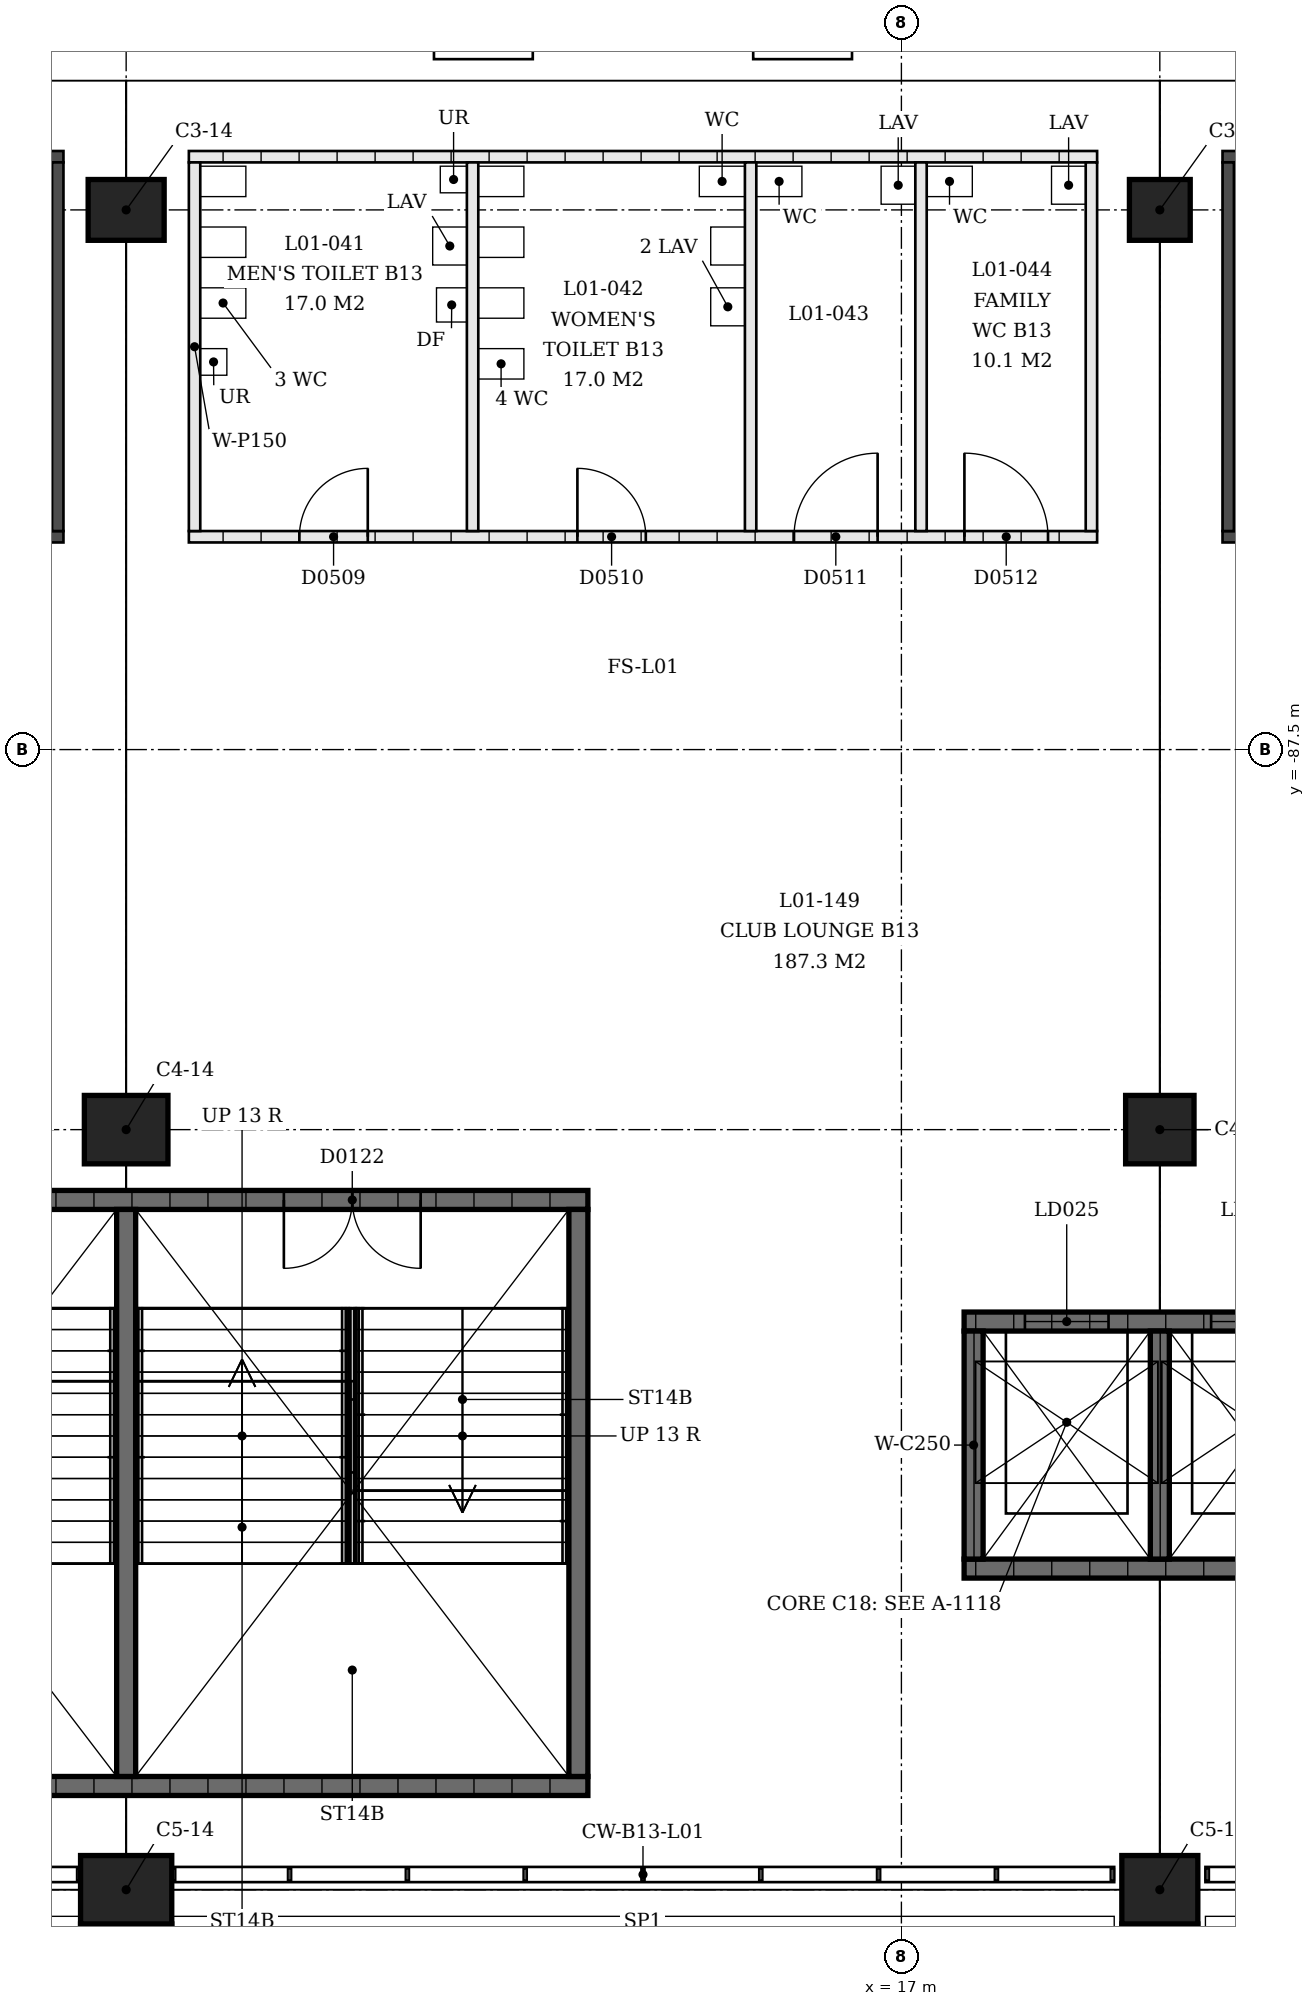
"""IFC4 building model, lengths in metres.
Left out: names, types, materials, properties, quantities, classifications, styles, units other than length and angle.
Written with IfcOpenShell. Run it as: python <this file> out.ifc"""

import sys

from ifc_helpers import new_model, si_unit, direction, frame, frame_2d, origin, origin_2d, place, context, subcontext, project, spatial, rectangle, extrude, element, fill, save


model = new_model("IFC4")
c1 = context("Model", 3, precision=1e-05, world=origin(), true_north=direction((0.0, 1.0)))
c2 = subcontext(c1, "Body", "Model", "MODEL_VIEW")
j1 = project(units=[si_unit("LENGTHUNIT", "METRE"), si_unit("PLANEANGLEUNIT", "RADIAN")], contexts=[c1])
p1 = place(None, origin())
s1 = spatial("IfcSite", under=j1, at=p1, CompositionType="ELEMENT")
p2 = place(p1, origin())
s2 = spatial("IfcBuilding", under=s1, at=p2, CompositionType="ELEMENT")
p3 = place(p2, frame((0.0, 0.0, 4.5)))
s3 = spatial("IfcBuildingStorey", under=s2, at=p3, CompositionType="ELEMENT", Elevation=4.5)
p4 = place(p3, frame((20.4, -80.4, 0.0), z_axis=(0.0, 0.0, 1.0), x_axis=(1.0, 0.0, 0.0)))
e1 = element("IfcColumn", 1, at=p4, inside=s3, PredefinedType="COLUMN", context=c2, shape_type="SweptSolid", body=[
    extrude(rectangle(XDim=0.8, YDim=0.8, at=origin_2d()), origin(), (0.0, 0.0, 1.0), 4.5),
])
p5 = place(p3, frame((20.4, -92.5, 0.0), z_axis=(0.0, 0.0, 1.0), x_axis=(1.0, 0.0, 0.0)))
e2 = element("IfcColumn", 2, at=p5, inside=s3, PredefinedType="COLUMN", context=c2, shape_type="SweptSolid", body=[
    extrude(rectangle(XDim=0.9, YDim=0.9, at=origin_2d()), origin(), (0.0, 0.0, 1.0), 4.5),
])
p6 = place(p3, frame((20.4, -102.5, 0.0), z_axis=(0.0, 0.0, 1.0), x_axis=(1.0, 0.0, 0.0)))
e3 = element("IfcColumn", 3, at=p6, inside=s3, PredefinedType="COLUMN", context=c2, shape_type="SweptSolid", body=[
    extrude(rectangle(XDim=1.0, YDim=0.9, at=origin_2d()), origin(), (0.0, 0.0, 1.0), 4.5),
])
p7 = place(p3, frame((6.8, -80.4, 0.0), z_axis=(0.0, 0.0, 1.0), x_axis=(1.0, 0.0, 0.0)))
e4 = element("IfcColumn", 4, at=p7, inside=s3, PredefinedType="COLUMN", context=c2, shape_type="SweptSolid", body=[
    extrude(rectangle(XDim=1.0, YDim=0.8, at=origin_2d()), origin(), (0.0, 0.0, 1.0), 4.5),
])
p8 = place(p3, frame((6.8, -92.5, 0.0), z_axis=(0.0, 0.0, 1.0), x_axis=(1.0, 0.0, 0.0)))
e5 = element("IfcColumn", 5, at=p8, inside=s3, PredefinedType="COLUMN", context=c2, shape_type="SweptSolid", body=[
    extrude(rectangle(XDim=1.1, YDim=0.9, at=origin_2d()), origin(), (0.0, 0.0, 1.0), 4.5),
])
p9 = place(p3, frame((6.8, -102.5, 0.0), z_axis=(0.0, 0.0, 1.0), x_axis=(1.0, 0.0, 0.0)))
e6 = element("IfcColumn", 6, at=p9, inside=s3, PredefinedType="COLUMN", context=c2, shape_type="SweptSolid", body=[
    extrude(rectangle(XDim=1.2, YDim=0.9, at=origin_2d()), origin(), (0.0, 0.0, 1.0), 4.5),
])
p10 = place(p3, frame((0.725, -93.425, 0.0), z_axis=(0.0, 0.0, 1.0), x_axis=(1.0, 0.0, 0.0)))
e7 = element("IfcWall", 7, at=p10, inside=s3, PredefinedType="SHEAR", context=c2, shape_type="SweptSolid", body=[
    extrude(rectangle(XDim=12.15, YDim=0.25, at=frame_2d((6.075, 0.0))), origin(), (0.0, 0.0, 1.0), 4.09),
])
p11 = place(p10, frame((2.2, 0.0, 0.0)))
e8 = element("IfcOpeningElement", 8, at=p11, cuts=e7, PredefinedType="OPENING", context=c2, shape_type="SweptSolid", body=[
    extrude(rectangle(XDim=1.8, YDim=2.1, at=frame_2d((0.9, 1.05))), frame((0.0, 0.125, 0.0), z_axis=(0.0, -1.0, 0.0), x_axis=(1.0, 0.0, 0.0)), (0.0, 0.0, 1.0), 0.25),
])
p12 = place(p10, frame((8.15, 0.0, 0.0)))
e9 = element("IfcOpeningElement", 9, at=p12, cuts=e7, PredefinedType="OPENING", context=c2, shape_type="SweptSolid", body=[
    extrude(rectangle(XDim=1.8, YDim=2.1, at=frame_2d((0.9, 1.05))), frame((0.0, 0.125, 0.0), z_axis=(0.0, -1.0, 0.0), x_axis=(1.0, 0.0, 0.0)), (0.0, 0.0, 1.0), 0.25),
])
p13 = place(p3, frame((0.725, -101.135, 0.0), z_axis=(0.0, 0.0, 1.0), x_axis=(1.0, 0.0, 0.0)))
e10 = element("IfcWall", 10, at=p13, inside=s3, PredefinedType="SHEAR", context=c2, shape_type="SweptSolid", body=[
    extrude(rectangle(XDim=12.15, YDim=0.25, at=frame_2d((6.075, 0.0))), origin(), (0.0, 0.0, 1.0), 4.09),
])
for number, where, z_axis, x_axis in (
    (11, (12.75, -93.55, 0.0), (0.0, 0.0, 1.0), (0.0, -1.0, 0.0)),
    (12, (6.8, -93.55, 0.0), (0.0, 0.0, 1.0), (0.0, -1.0, 0.0)),
):
    element("IfcWall", number, at=place(p3, frame(where, z_axis=z_axis, x_axis=x_axis)), inside=s3, PredefinedType="SHEAR", context=c2, shape_type="SweptSolid", body=[
        extrude(rectangle(XDim=7.46, YDim=0.25, at=frame_2d((3.73, 0.0))), origin(), (0.0, 0.0, 1.0), 4.09),
    ])
p14 = place(p3, frame((17.825, -95.025, 0.0), z_axis=(0.0, 0.0, 1.0), x_axis=(1.0, 0.0, 0.0)))
e13 = element("IfcWall", 13, at=p14, inside=s3, PredefinedType="SHEAR", context=c2, shape_type="SweptSolid", body=[
    extrude(rectangle(XDim=5.15, YDim=0.25, at=frame_2d((2.575, 0.0))), origin(), (0.0, 0.0, 1.0), 4.09),
])
p15 = place(p14, frame((0.8, 0.0, 0.0)))
e14 = element("IfcOpeningElement", 14, at=p15, cuts=e13, PredefinedType="OPENING", context=c2, shape_type="SweptSolid", body=[
    extrude(rectangle(XDim=1.1, YDim=2.1, at=frame_2d((0.55, 1.05))), frame((0.0, 0.125, 0.0), z_axis=(0.0, -1.0, 0.0), x_axis=(1.0, 0.0, 0.0)), (0.0, 0.0, 1.0), 0.25),
])
p16 = place(p14, frame((3.25, 0.0, 0.0)))
e15 = element("IfcOpeningElement", 15, at=p16, cuts=e13, PredefinedType="OPENING", context=c2, shape_type="SweptSolid", body=[
    extrude(rectangle(XDim=1.1, YDim=2.1, at=frame_2d((0.55, 1.05))), frame((0.0, 0.125, 0.0), z_axis=(0.0, -1.0, 0.0), x_axis=(1.0, 0.0, 0.0)), (0.0, 0.0, 1.0), 0.25),
])
p17 = place(p3, frame((17.825, -98.275, 0.0), z_axis=(0.0, 0.0, 1.0), x_axis=(1.0, 0.0, 0.0)))
e16 = element("IfcWall", 16, at=p17, inside=s3, PredefinedType="SHEAR", context=c2, shape_type="SweptSolid", body=[
    extrude(rectangle(XDim=5.15, YDim=0.25, at=frame_2d((2.575, 0.0))), origin(), (0.0, 0.0, 1.0), 4.09),
])
for number, where, z_axis, x_axis in (
    (17, (17.95, -95.15, 0.0), (0.0, 0.0, 1.0), (0.0, -1.0, 0.0)),
    (18, (20.4, -95.15, 0.0), (0.0, 0.0, 1.0), (0.0, -1.0, 0.0)),
):
    element("IfcWall", number, at=place(p3, frame(where, z_axis=z_axis, x_axis=x_axis)), inside=s3, PredefinedType="SHEAR", context=c2, shape_type="SweptSolid", body=[
        extrude(rectangle(XDim=3.0, YDim=0.25, at=frame_2d((1.5, 0.0))), origin(), (0.0, 0.0, 1.0), 4.09),
    ])
p18 = place(p3, frame((33.175, -79.7, 0.0), z_axis=(0.0, 0.0, 1.0), x_axis=(-1.0, 0.0, 0.0)))
e19 = element("IfcWall", 19, at=p18, inside=s3, PredefinedType="SOLIDWALL", context=c2, shape_type="SweptSolid", body=[
    extrude(rectangle(XDim=11.95, YDim=0.15, at=frame_2d((5.975, 0.0))), origin(), (0.0, 0.0, 1.0), 3.0),
])
p19 = place(p3, frame((33.175, -84.7, 0.0), z_axis=(0.0, 0.0, 1.0), x_axis=(-1.0, 0.0, 0.0)))
e20 = element("IfcWall", 20, at=p19, inside=s3, PredefinedType="SOLIDWALL", context=c2, shape_type="SweptSolid", body=[
    extrude(rectangle(XDim=11.95, YDim=0.15, at=frame_2d((5.975, 0.0))), origin(), (0.0, 0.0, 1.0), 3.0),
])
p20 = place(p19, frame((2.525, 0.0, 0.0)))
e21 = element("IfcOpeningElement", 21, at=p20, cuts=e20, PredefinedType="OPENING", context=c2, shape_type="SweptSolid", body=[
    extrude(rectangle(XDim=1.0, YDim=2.1, at=frame_2d((0.5, 1.05))), frame((0.0, 0.075, 0.0), z_axis=(0.0, -1.0, 0.0), x_axis=(1.0, 0.0, 0.0)), (0.0, 0.0, 1.0), 0.15),
])
p21 = place(p19, frame((8.425, 0.0, 0.0)))
e22 = element("IfcOpeningElement", 22, at=p21, cuts=e20, PredefinedType="OPENING", context=c2, shape_type="SweptSolid", body=[
    extrude(rectangle(XDim=1.0, YDim=2.1, at=frame_2d((0.5, 1.05))), frame((0.0, 0.075, 0.0), z_axis=(0.0, -1.0, 0.0), x_axis=(1.0, 0.0, 0.0)), (0.0, 0.0, 1.0), 0.15),
])
p22 = place(p3, frame((21.3, -79.775, 0.0), z_axis=(0.0, 0.0, 1.0), x_axis=(0.0, -1.0, 0.0)))
e23 = element("IfcWall", 23, at=p22, inside=s3, PredefinedType="SOLIDWALL", context=c2, shape_type="SweptSolid", body=[
    extrude(rectangle(XDim=4.85, YDim=0.15, at=frame_2d((2.425, 0.0))), origin(), (0.0, 0.0, 1.0), 3.0),
])
p23 = place(p3, frame((7.625, -79.7, 0.0), z_axis=(0.0, 0.0, 1.0), x_axis=(1.0, 0.0, 0.0)))
e24 = element("IfcWall", 24, at=p23, inside=s3, PredefinedType="PARTITIONING", context=c2, shape_type="SweptSolid", body=[
    extrude(rectangle(XDim=11.95, YDim=0.15, at=frame_2d((5.975, 0.0))), origin(), (0.0, 0.0, 1.0), 3.0),
])
p24 = place(p3, frame((7.625, -84.7, 0.0), z_axis=(0.0, 0.0, 1.0), x_axis=(1.0, 0.0, 0.0)))
e25 = element("IfcWall", 25, at=p24, inside=s3, PredefinedType="PARTITIONING", context=c2, shape_type="SweptSolid", body=[
    extrude(rectangle(XDim=11.95, YDim=0.15, at=frame_2d((5.975, 0.0))), origin(), (0.0, 0.0, 1.0), 3.0),
])
p25 = place(p24, frame((1.454, 0.0, 0.0)))
e26 = element("IfcOpeningElement", 26, at=p25, cuts=e25, PredefinedType="OPENING", context=c2, shape_type="SweptSolid", body=[
    extrude(rectangle(XDim=0.9, YDim=2.1, at=frame_2d((0.45, 1.05))), frame((0.0, 0.075, 0.0), z_axis=(0.0, -1.0, 0.0), x_axis=(1.0, 0.0, 0.0)), (0.0, 0.0, 1.0), 0.15),
])
p26 = place(p24, frame((5.112, 0.0, 0.0)))
e27 = element("IfcOpeningElement", 27, at=p26, cuts=e25, PredefinedType="OPENING", context=c2, shape_type="SweptSolid", body=[
    extrude(rectangle(XDim=0.9, YDim=2.1, at=frame_2d((0.45, 1.05))), frame((0.0, 0.075, 0.0), z_axis=(0.0, -1.0, 0.0), x_axis=(1.0, 0.0, 0.0)), (0.0, 0.0, 1.0), 0.15),
])
p27 = place(p24, frame((7.962, 0.0, 0.0)))
e28 = element("IfcOpeningElement", 28, at=p27, cuts=e25, PredefinedType="OPENING", context=c2, shape_type="SweptSolid", body=[
    extrude(rectangle(XDim=1.1, YDim=2.1, at=frame_2d((0.55, 1.05))), frame((0.0, 0.075, 0.0), z_axis=(0.0, -1.0, 0.0), x_axis=(1.0, 0.0, 0.0)), (0.0, 0.0, 1.0), 0.15),
])
p28 = place(p24, frame((10.204, 0.0, 0.0)))
e29 = element("IfcOpeningElement", 29, at=p28, cuts=e25, PredefinedType="OPENING", context=c2, shape_type="SweptSolid", body=[
    extrude(rectangle(XDim=1.1, YDim=2.1, at=frame_2d((0.55, 1.05))), frame((0.0, 0.075, 0.0), z_axis=(0.0, -1.0, 0.0), x_axis=(1.0, 0.0, 0.0)), (0.0, 0.0, 1.0), 0.15),
])
for number, where, z_axis, x_axis in (
    (30, (7.7, -79.775, 0.0), (0.0, 0.0, 1.0), (0.0, -1.0, 0.0)),
    (31, (11.358, -79.775, 0.0), (0.0, 0.0, 1.0), (0.0, -1.0, 0.0)),
    (32, (15.016, -79.775, 0.0), (0.0, 0.0, 1.0), (0.0, -1.0, 0.0)),
    (33, (17.258, -79.775, 0.0), (0.0, 0.0, 1.0), (0.0, -1.0, 0.0)),
    (34, (19.5, -79.775, 0.0), (0.0, 0.0, 1.0), (0.0, -1.0, 0.0)),
):
    element("IfcWall", number, at=place(p3, frame(where, z_axis=z_axis, x_axis=x_axis)), inside=s3, PredefinedType="PARTITIONING", context=c2, shape_type="SweptSolid", body=[
        extrude(rectangle(XDim=4.85, YDim=0.15, at=frame_2d((2.425, 0.0))), origin(), (0.0, 0.0, 1.0), 3.0),
    ])
p29 = place(p3, frame((5.975, -79.7, 0.0), z_axis=(0.0, 0.0, 1.0), x_axis=(-1.0, 0.0, 0.0)))
e35 = element("IfcWall", 35, at=p29, inside=s3, PredefinedType="SOLIDWALL", context=c2, shape_type="SweptSolid", body=[
    extrude(rectangle(XDim=11.95, YDim=0.15, at=frame_2d((5.975, 0.0))), origin(), (0.0, 0.0, 1.0), 3.0),
])
p30 = place(p3, frame((5.975, -84.7, 0.0), z_axis=(0.0, 0.0, 1.0), x_axis=(-1.0, 0.0, 0.0)))
e36 = element("IfcWall", 36, at=p30, inside=s3, PredefinedType="SOLIDWALL", context=c2, shape_type="SweptSolid", body=[
    extrude(rectangle(XDim=11.95, YDim=0.15, at=frame_2d((5.975, 0.0))), origin(), (0.0, 0.0, 1.0), 3.0),
])
p31 = place(p30, frame((2.525, 0.0, 0.0)))
e37 = element("IfcOpeningElement", 37, at=p31, cuts=e36, PredefinedType="OPENING", context=c2, shape_type="SweptSolid", body=[
    extrude(rectangle(XDim=1.0, YDim=2.1, at=frame_2d((0.5, 1.05))), frame((0.0, 0.075, 0.0), z_axis=(0.0, -1.0, 0.0), x_axis=(1.0, 0.0, 0.0)), (0.0, 0.0, 1.0), 0.15),
])
p32 = place(p30, frame((8.425, 0.0, 0.0)))
e38 = element("IfcOpeningElement", 38, at=p32, cuts=e36, PredefinedType="OPENING", context=c2, shape_type="SweptSolid", body=[
    extrude(rectangle(XDim=1.0, YDim=2.1, at=frame_2d((0.5, 1.05))), frame((0.0, 0.075, 0.0), z_axis=(0.0, -1.0, 0.0), x_axis=(1.0, 0.0, 0.0)), (0.0, 0.0, 1.0), 0.15),
])
p33 = place(p3, frame((5.9, -79.775, 0.0), z_axis=(0.0, 0.0, 1.0), x_axis=(0.0, -1.0, 0.0)))
e39 = element("IfcWall", 39, at=p33, inside=s3, PredefinedType="SOLIDWALL", context=c2, shape_type="SweptSolid", body=[
    extrude(rectangle(XDim=4.85, YDim=0.15, at=frame_2d((2.425, 0.0))), origin(), (0.0, 0.0, 1.0), 3.0),
])
p34 = place(p12, origin())
e40 = element("IfcDoor", 40, at=p34, inside=s3, OperationType="DOUBLE_DOOR_SINGLE_SWING", PredefinedType="DOOR", context=c2, shape_type="SweptSolid", body=[
    extrude(rectangle(XDim=1.8, YDim=2.1, at=frame_2d((0.9, 1.05))), frame((0.0, 0.025, 0.0), z_axis=(0.0, -1.0, 0.0), x_axis=(1.0, 0.0, 0.0)), (0.0, 0.0, 1.0), 0.05),
])
fill(e9, e40)
p35 = place(p15, origin())
e41 = element("IfcDoor", 41, at=p35, inside=s3, OperationType="SLIDING_TO_LEFT", PredefinedType="DOOR", context=c2, shape_type="SweptSolid", body=[
    extrude(rectangle(XDim=1.1, YDim=2.1, at=frame_2d((0.55, 1.05))), frame((0.0, 0.025, 0.0), z_axis=(0.0, -1.0, 0.0), x_axis=(1.0, 0.0, 0.0)), (0.0, 0.0, 1.0), 0.05),
])
fill(e14, e41)
p36 = place(p16, origin())
e42 = element("IfcDoor", 42, at=p36, inside=s3, OperationType="SLIDING_TO_LEFT", PredefinedType="DOOR", context=c2, shape_type="SweptSolid", body=[
    extrude(rectangle(XDim=1.1, YDim=2.1, at=frame_2d((0.55, 1.05))), frame((0.0, 0.025, 0.0), z_axis=(0.0, -1.0, 0.0), x_axis=(1.0, 0.0, 0.0)), (0.0, 0.0, 1.0), 0.05),
])
fill(e15, e42)
p37 = place(p25, origin())
e43 = element("IfcDoor", 43, at=p37, inside=s3, OperationType="SINGLE_SWING_LEFT", PredefinedType="DOOR", context=c2, shape_type="SweptSolid", body=[
    extrude(rectangle(XDim=0.9, YDim=2.1, at=frame_2d((0.45, 1.05))), frame((0.0, 0.025, 0.0), z_axis=(0.0, -1.0, 0.0), x_axis=(1.0, 0.0, 0.0)), (0.0, 0.0, 1.0), 0.05),
])
fill(e26, e43)
p38 = place(p26, origin())
e44 = element("IfcDoor", 44, at=p38, inside=s3, OperationType="SINGLE_SWING_RIGHT", PredefinedType="DOOR", context=c2, shape_type="SweptSolid", body=[
    extrude(rectangle(XDim=0.9, YDim=2.1, at=frame_2d((0.45, 1.05))), frame((0.0, 0.025, 0.0), z_axis=(0.0, -1.0, 0.0), x_axis=(1.0, 0.0, 0.0)), (0.0, 0.0, 1.0), 0.05),
])
fill(e27, e44)
p39 = place(p27, origin())
e45 = element("IfcDoor", 45, at=p39, inside=s3, OperationType="SINGLE_SWING_LEFT", PredefinedType="DOOR", context=c2, shape_type="SweptSolid", body=[
    extrude(rectangle(XDim=1.1, YDim=2.1, at=frame_2d((0.55, 1.05))), frame((0.0, 0.025, 0.0), z_axis=(0.0, -1.0, 0.0), x_axis=(1.0, 0.0, 0.0)), (0.0, 0.0, 1.0), 0.05),
])
fill(e28, e45)
p40 = place(p28, origin())
e46 = element("IfcDoor", 46, at=p40, inside=s3, OperationType="SINGLE_SWING_RIGHT", PredefinedType="DOOR", context=c2, shape_type="SweptSolid", body=[
    extrude(rectangle(XDim=1.1, YDim=2.1, at=frame_2d((0.55, 1.05))), frame((0.0, 0.025, 0.0), z_axis=(0.0, -1.0, 0.0), x_axis=(1.0, 0.0, 0.0)), (0.0, 0.0, 1.0), 0.05),
])
fill(e29, e46)
save(model, sys.argv[1])
